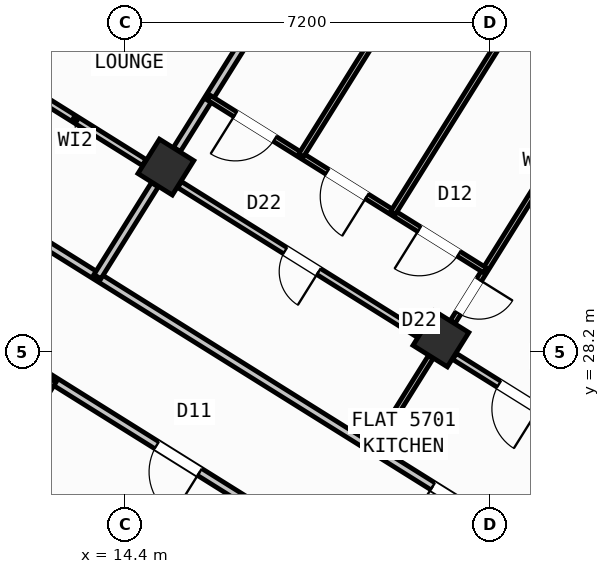
"""IFC4 building model, lengths in metres.
Left out: names, types, materials, properties, quantities, classifications, styles, units other than length and angle.
Written with IfcOpenShell. Run it as: python <this file> out.ifc"""

import sys

from ifc_helpers import new_model, si_unit, direction, frame, frame_2d, origin, origin_2d, place, context, subcontext, project, spatial, rectangle, hollow_rectangle, extrude, source, transform, mapped, element, fill, save


model = new_model("IFC4")
c1 = context("Model", 3, precision=1e-05, world=origin(), true_north=direction((0.0, 1.0)))
c2 = subcontext(c1, "Body", "Model", "MODEL_VIEW")
j1 = project(units=[si_unit("LENGTHUNIT", "METRE"), si_unit("PLANEANGLEUNIT", "RADIAN")], contexts=[c1])
p1 = place(None, origin())
s1 = spatial("IfcSite", under=j1, at=p1, CompositionType="ELEMENT")
p2 = place(p1, origin())
s2 = spatial("IfcBuilding", under=s1, at=p2, CompositionType="ELEMENT")
p3 = place(p2, frame((0.0, 0.0, 225.6)))
s3 = spatial("IfcBuildingStorey", under=s2, at=p3, CompositionType="ELEMENT", Elevation=225.6)
m1 = source(origin(), c2, "Body", "SweptSolid", [
    extrude(hollow_rectangle(XDim=0.8, YDim=0.8, WallThickness=0.032, at=origin_2d()), origin(), (0.0, 0.0, 1.0), 3.6),
])
for number, where, z_axis, x_axis in (
    (1, (20.632, 28.452, 0.0), (0.0, 0.0, 1.0), (-0.848, 0.53, 0.0)),
    (2, (15.205, 31.844, 0.0), (0.0, 0.0, 1.0), (-0.848, 0.53, 0.0)),
):
    element("IfcColumn", number, at=place(p3, frame(where, z_axis=z_axis, x_axis=x_axis)), inside=s3, PredefinedType="COLUMN", context=c2, shape_type="MappedRepresentation", body=[
        mapped(m1, transform((0.0, 0.0, 0.0), scale=1.0)),
    ])
p4 = place(p3, frame((31.76, 12.183, 0.0), z_axis=(0.0, 0.0, 1.0), x_axis=(-0.848047074256, 0.529920899612, 0.0)))
e3 = element("IfcWall", 3, at=p4, inside=s3, PredefinedType="STANDARD", context=c2, shape_type="SweptSolid", body=[
    extrude(rectangle(XDim=30.652, YDim=0.32, at=frame_2d((15.326, 0.0))), origin(), (0.0, 0.0, 1.0), 3.35),
])
p5 = place(p4, frame((15.166, 0.0, 0.0)))
e4 = element("IfcOpeningElement", 4, at=p5, cuts=e3, PredefinedType="OPENING", context=c2, shape_type="SweptSolid", body=[
    extrude(rectangle(XDim=1.2, YDim=2.15, at=frame_2d((0.6, 1.075))), frame((0.0, 0.17, 0.0), z_axis=(0.0, -1.0, 0.0), x_axis=(1.0, 0.0, 0.0)), (0.0, 0.0, 1.0), 0.34),
])
p6 = place(p4, frame((2.24, 0.0, 0.9)))
e5 = element("IfcOpeningElement", 5, at=p6, cuts=e3, PredefinedType="OPENING", context=c2, shape_type="SweptSolid", body=[
    extrude(rectangle(XDim=1.65, YDim=1.45, at=frame_2d((0.825, 0.725))), frame((0.0, 0.17, 0.0), z_axis=(0.0, -1.0, 0.0), x_axis=(1.0, 0.0, 0.0)), (0.0, 0.0, 1.0), 0.34),
])
p7 = place(p4, frame((7.469, 0.0, 0.9)))
e6 = element("IfcOpeningElement", 6, at=p7, cuts=e3, PredefinedType="OPENING", context=c2, shape_type="SweptSolid", body=[
    extrude(rectangle(XDim=1.65, YDim=1.45, at=frame_2d((0.825, 0.725))), frame((0.0, 0.17, 0.0), z_axis=(0.0, -1.0, 0.0), x_axis=(1.0, 0.0, 0.0)), (0.0, 0.0, 1.0), 0.34),
])
p8 = place(p4, frame((12.623, 0.0, 1.0)))
e7 = element("IfcOpeningElement", 7, at=p8, cuts=e3, PredefinedType="OPENING", context=c2, shape_type="SweptSolid", body=[
    extrude(rectangle(XDim=0.9, YDim=1.25, at=frame_2d((0.45, 0.625))), frame((0.0, 0.17, 0.0), z_axis=(0.0, -1.0, 0.0), x_axis=(1.0, 0.0, 0.0)), (0.0, 0.0, 1.0), 0.34),
])
p9 = place(p4, frame((19.556, 0.0, 1.0)))
e8 = element("IfcOpeningElement", 8, at=p9, cuts=e3, PredefinedType="OPENING", context=c2, shape_type="SweptSolid", body=[
    extrude(rectangle(XDim=0.9, YDim=1.25, at=frame_2d((0.45, 0.625))), frame((0.0, 0.17, 0.0), z_axis=(0.0, -1.0, 0.0), x_axis=(1.0, 0.0, 0.0)), (0.0, 0.0, 1.0), 0.34),
])
p10 = place(p4, frame((21.95, 0.0, 1.0)))
e9 = element("IfcOpeningElement", 9, at=p10, cuts=e3, PredefinedType="OPENING", context=c2, shape_type="SweptSolid", body=[
    extrude(rectangle(XDim=0.9, YDim=1.25, at=frame_2d((0.45, 0.625))), frame((0.0, 0.17, 0.0), z_axis=(0.0, -1.0, 0.0), x_axis=(1.0, 0.0, 0.0)), (0.0, 0.0, 1.0), 0.34),
])
p11 = place(p4, frame((26.983, 0.0, 0.9)))
e10 = element("IfcOpeningElement", 10, at=p11, cuts=e3, PredefinedType="OPENING", context=c2, shape_type="SweptSolid", body=[
    extrude(rectangle(XDim=1.35, YDim=1.45, at=frame_2d((0.675, 0.725))), frame((0.0, 0.17, 0.0), z_axis=(0.0, -1.0, 0.0), x_axis=(1.0, 0.0, 0.0)), (0.0, 0.0, 1.0), 0.34),
])
p12 = place(p3, frame((5.7, 28.71, 0.0), z_axis=(0.0, 0.0, 1.0), x_axis=(0.529923711467, 0.8480453172, 0.0)))
e11 = element("IfcWall", 11, at=p12, inside=s3, PredefinedType="STANDARD", context=c2, shape_type="SweptSolid", body=[
    extrude(rectangle(XDim=21.587, YDim=0.32, at=frame_2d((10.794, 0.0))), origin(), (0.0, 0.0, 1.0), 2.825),
])
p13 = place(p12, frame((1.329, 0.0, 1.0)))
e12 = element("IfcOpeningElement", 12, at=p13, cuts=e11, PredefinedType="OPENING", context=c2, shape_type="SweptSolid", body=[
    extrude(rectangle(XDim=0.9, YDim=1.25, at=frame_2d((0.45, 0.625))), frame((0.0, 0.17, 0.0), z_axis=(0.0, -1.0, 0.0), x_axis=(1.0, 0.0, 0.0)), (0.0, 0.0, 1.0), 0.34),
])
p14 = place(p12, frame((5.859, 0.0, 1.0)))
e13 = element("IfcOpeningElement", 13, at=p14, cuts=e11, PredefinedType="OPENING", context=c2, shape_type="SweptSolid", body=[
    extrude(rectangle(XDim=0.9, YDim=1.25, at=frame_2d((0.45, 0.625))), frame((0.0, 0.17, 0.0), z_axis=(0.0, -1.0, 0.0), x_axis=(1.0, 0.0, 0.0)), (0.0, 0.0, 1.0), 0.34),
])
p15 = place(p12, frame((10.369, 0.0, 0.95)))
e14 = element("IfcOpeningElement", 14, at=p15, cuts=e11, PredefinedType="OPENING", context=c2, shape_type="SweptSolid", body=[
    extrude(rectangle(XDim=1.95, YDim=1.35, at=frame_2d((0.975, 0.675))), frame((0.0, 0.17, 0.0), z_axis=(0.0, -1.0, 0.0), x_axis=(1.0, 0.0, 0.0)), (0.0, 0.0, 1.0), 0.34),
])
p16 = place(p12, frame((16.5, 0.0, 1.0)))
e15 = element("IfcOpeningElement", 15, at=p16, cuts=e11, PredefinedType="OPENING", context=c2, shape_type="SweptSolid", body=[
    extrude(rectangle(XDim=0.9, YDim=1.25, at=frame_2d((0.45, 0.625))), frame((0.0, 0.17, 0.0), z_axis=(0.0, -1.0, 0.0), x_axis=(1.0, 0.0, 0.0)), (0.0, 0.0, 1.0), 0.34),
])
p17 = place(p12, frame((18.913, 0.0, 1.0)))
e16 = element("IfcOpeningElement", 16, at=p17, cuts=e11, PredefinedType="OPENING", context=c2, shape_type="SweptSolid", body=[
    extrude(rectangle(XDim=0.9, YDim=1.25, at=frame_2d((0.45, 0.625))), frame((0.0, 0.17, 0.0), z_axis=(0.0, -1.0, 0.0), x_axis=(1.0, 0.0, 0.0)), (0.0, 0.0, 1.0), 0.34),
])
p18 = place(p3, frame((17.424, 47.083, 0.0), z_axis=(0.0, 0.0, 1.0), x_axis=(0.848049927979, -0.529916332693, 0.0)))
e17 = element("IfcWall", 17, at=p18, inside=s3, PredefinedType="STANDARD", context=c2, shape_type="SweptSolid", body=[
    extrude(rectangle(XDim=29.223, YDim=0.32, at=frame_2d((14.612, 0.0))), origin(), (0.0, 0.0, 1.0), 3.35),
])
p19 = place(p18, frame((3.709, 0.0, 0.0)))
e18 = element("IfcOpeningElement", 18, at=p19, cuts=e17, PredefinedType="OPENING", context=c2, shape_type="SweptSolid", body=[
    extrude(rectangle(XDim=1.05, YDim=2.15, at=frame_2d((0.525, 1.075))), frame((0.0, 0.17, 0.0), z_axis=(0.0, -1.0, 0.0), x_axis=(1.0, 0.0, 0.0)), (0.0, 0.0, 1.0), 0.34),
])
p20 = place(p18, frame((0.809, 0.0, 1.0)))
e19 = element("IfcOpeningElement", 19, at=p20, cuts=e17, PredefinedType="OPENING", context=c2, shape_type="SweptSolid", body=[
    extrude(rectangle(XDim=0.9, YDim=1.25, at=frame_2d((0.45, 0.625))), frame((0.0, 0.17, 0.0), z_axis=(0.0, -1.0, 0.0), x_axis=(1.0, 0.0, 0.0)), (0.0, 0.0, 1.0), 0.34),
])
p21 = place(p18, frame((13.811, 0.0, 0.9)))
e20 = element("IfcOpeningElement", 20, at=p21, cuts=e17, PredefinedType="OPENING", context=c2, shape_type="SweptSolid", body=[
    extrude(rectangle(XDim=1.35, YDim=1.45, at=frame_2d((0.675, 0.725))), frame((0.0, 0.17, 0.0), z_axis=(0.0, -1.0, 0.0), x_axis=(1.0, 0.0, 0.0)), (0.0, 0.0, 1.0), 0.34),
])
p22 = place(p18, frame((17.254, 0.0, 1.0)))
e21 = element("IfcOpeningElement", 21, at=p22, cuts=e17, PredefinedType="OPENING", context=c2, shape_type="SweptSolid", body=[
    extrude(rectangle(XDim=0.9, YDim=1.25, at=frame_2d((0.45, 0.625))), frame((0.0, 0.17, 0.0), z_axis=(0.0, -1.0, 0.0), x_axis=(1.0, 0.0, 0.0)), (0.0, 0.0, 1.0), 0.34),
])
p23 = place(p18, frame((21.364, 0.0, 1.0)))
e22 = element("IfcOpeningElement", 22, at=p23, cuts=e17, PredefinedType="OPENING", context=c2, shape_type="SweptSolid", body=[
    extrude(rectangle(XDim=0.9, YDim=1.25, at=frame_2d((0.45, 0.625))), frame((0.0, 0.17, 0.0), z_axis=(0.0, -1.0, 0.0), x_axis=(1.0, 0.0, 0.0)), (0.0, 0.0, 1.0), 0.34),
])
p24 = place(p18, frame((26.003, 0.0, 1.0)))
e23 = element("IfcOpeningElement", 23, at=p24, cuts=e17, PredefinedType="OPENING", context=c2, shape_type="SweptSolid", body=[
    extrude(rectangle(XDim=0.9, YDim=1.25, at=frame_2d((0.45, 0.625))), frame((0.0, 0.17, 0.0), z_axis=(0.0, -1.0, 0.0), x_axis=(1.0, 0.0, 0.0)), (0.0, 0.0, 1.0), 0.34),
])
p25 = place(p18, frame((11.211, 0.0, 1.0)))
e24 = element("IfcOpeningElement", 24, at=p25, cuts=e17, PredefinedType="OPENING", context=c2, shape_type="SweptSolid", body=[
    extrude(rectangle(XDim=0.65, YDim=1.15, at=frame_2d((0.325, 0.575))), frame((0.0, 0.17, 0.0), z_axis=(0.0, -1.0, 0.0), x_axis=(1.0, 0.0, 0.0)), (0.0, 0.0, 1.0), 0.34),
])
p26 = place(p18, frame((9.079, 0.0, 1.0)))
e25 = element("IfcOpeningElement", 25, at=p26, cuts=e17, PredefinedType="OPENING", context=c2, shape_type="SweptSolid", body=[
    extrude(rectangle(XDim=0.65, YDim=1.15, at=frame_2d((0.325, 0.575))), frame((0.0, 0.17, 0.0), z_axis=(0.0, -1.0, 0.0), x_axis=(1.0, 0.0, 0.0)), (0.0, 0.0, 1.0), 0.34),
])
p27 = place(p18, frame((6.951, 0.0, 1.0)))
e26 = element("IfcOpeningElement", 26, at=p27, cuts=e17, PredefinedType="OPENING", context=c2, shape_type="SweptSolid", body=[
    extrude(rectangle(XDim=0.65, YDim=1.15, at=frame_2d((0.325, 0.575))), frame((0.0, 0.17, 0.0), z_axis=(0.0, -1.0, 0.0), x_axis=(1.0, 0.0, 0.0)), (0.0, 0.0, 1.0), 0.34),
])
p28 = place(p3, frame((22.495, 24.281, 0.0), z_axis=(0.0, 0.0, 1.0), x_axis=(-0.848052408131, 0.529912363569, 0.0)))
e27 = element("IfcWall", 27, at=p28, inside=s3, PredefinedType="PARTITIONING", context=c2, shape_type="SweptSolid", body=[
    extrude(rectangle(XDim=16.73, YDim=0.16, at=frame_2d((8.365, 0.0))), origin(), (0.0, 0.0, 1.0), 3.34),
])
p29 = place(p28, frame((1.385, 0.0, 0.0)))
e28 = element("IfcOpeningElement", 28, at=p29, cuts=e27, PredefinedType="OPENING", context=c2, shape_type="SweptSolid", body=[
    extrude(rectangle(XDim=1.0, YDim=2.1, at=frame_2d((0.5, 1.05))), frame((0.0, 0.09, 0.0), z_axis=(0.0, -1.0, 0.0), x_axis=(1.0, 0.0, 0.0)), (0.0, 0.0, 1.0), 0.18),
])
p30 = place(p28, frame((14.76, 0.0, 0.0)))
e29 = element("IfcOpeningElement", 29, at=p30, cuts=e27, PredefinedType="OPENING", context=c2, shape_type="SweptSolid", body=[
    extrude(rectangle(XDim=1.0, YDim=2.1, at=frame_2d((0.5, 1.05))), frame((0.0, 0.09, 0.0), z_axis=(0.0, -1.0, 0.0), x_axis=(1.0, 0.0, 0.0)), (0.0, 0.0, 1.0), 0.18),
])
p31 = place(p3, frame((21.329, 22.416, 0.0), z_axis=(0.0, 0.0, 1.0), x_axis=(-0.848052408131, 0.529912363569, 0.0)))
e30 = element("IfcWall", 30, at=p31, inside=s3, PredefinedType="PARTITIONING", context=c2, shape_type="SweptSolid", body=[
    extrude(rectangle(XDim=16.73, YDim=0.16, at=frame_2d((8.365, 0.0))), origin(), (0.0, 0.0, 1.0), 3.34),
])
p32 = place(p31, frame((1.505, 0.0, 0.0)))
e31 = element("IfcOpeningElement", 31, at=p32, cuts=e30, PredefinedType="OPENING", context=c2, shape_type="SweptSolid", body=[
    extrude(rectangle(XDim=1.0, YDim=2.1, at=frame_2d((0.5, 1.05))), frame((0.0, 0.09, 0.0), z_axis=(0.0, -1.0, 0.0), x_axis=(1.0, 0.0, 0.0)), (0.0, 0.0, 1.0), 0.18),
])
p33 = place(p31, frame((6.435, 0.0, 0.0)))
e32 = element("IfcOpeningElement", 32, at=p33, cuts=e30, PredefinedType="OPENING", context=c2, shape_type="SweptSolid", body=[
    extrude(rectangle(XDim=1.0, YDim=2.1, at=frame_2d((0.5, 1.05))), frame((0.0, 0.09, 0.0), z_axis=(0.0, -1.0, 0.0), x_axis=(1.0, 0.0, 0.0)), (0.0, 0.0, 1.0), 0.18),
])
p34 = place(p31, frame((12.784, 0.0, 0.0)))
e33 = element("IfcOpeningElement", 33, at=p34, cuts=e30, PredefinedType="OPENING", context=c2, shape_type="SweptSolid", body=[
    extrude(rectangle(XDim=1.0, YDim=2.1, at=frame_2d((0.5, 1.05))), frame((0.0, 0.09, 0.0), z_axis=(0.0, -1.0, 0.0), x_axis=(1.0, 0.0, 0.0)), (0.0, 0.0, 1.0), 0.18),
])
p35 = place(p3, frame((12.968, 27.64, 0.0), z_axis=(0.0, 0.0, 1.0), x_axis=(-0.52989628283, -0.848062456098, 0.0)))
e34 = element("IfcWall", 34, at=p35, inside=s3, PredefinedType="PARTITIONING", context=c2, shape_type="SweptSolid", body=[
    extrude(rectangle(XDim=2.138, YDim=0.16, at=frame_2d((1.069, 0.0))), origin(), (0.0, 0.0, 1.0), 3.34),
])
p36 = place(p3, frame((18.854, 37.685, 0.0), z_axis=(0.0, 0.0, 1.0), x_axis=(-0.529907440938, -0.848055484057, 0.0)))
e35 = element("IfcWall", 35, at=p36, inside=s3, PredefinedType="PARTITIONING", context=c2, shape_type="SweptSolid", body=[
    extrude(rectangle(XDim=6.476, YDim=0.16, at=frame_2d((3.238, 0.0))), origin(), (0.0, 0.0, 1.0), 2.825),
])
p37 = place(p3, frame((14.986, 31.494, 0.0), z_axis=(0.0, 0.0, 1.0), x_axis=(-0.52989628283, -0.848062456098, 0.0)))
e36 = element("IfcWall", 36, at=p37, inside=s3, PredefinedType="PARTITIONING", context=c2, shape_type="SweptSolid", body=[
    extrude(rectangle(XDim=2.138, YDim=0.16, at=frame_2d((1.069, 0.0))), origin(), (0.0, 0.0, 1.0), 2.825),
])
p38 = place(p3, frame((24.299, 34.283, 0.0), z_axis=(0.0, 0.0, 1.0), x_axis=(-0.529890499457, -0.848066069705, 0.0)))
e37 = element("IfcWall", 37, at=p38, inside=s3, PredefinedType="PARTITIONING", context=c2, shape_type="SweptSolid", body=[
    extrude(rectangle(XDim=6.476, YDim=0.11, at=frame_2d((3.238, 0.0))), origin(), (0.0, 0.0, 1.0), 2.825),
])
p39 = place(p38, frame((5.496, 0.0, 0.0)))
e38 = element("IfcOpeningElement", 38, at=p39, cuts=e37, PredefinedType="OPENING", context=c2, shape_type="SweptSolid", body=[
    extrude(rectangle(XDim=0.78, YDim=2.05, at=frame_2d((0.39, 1.025))), frame((0.0, 0.065, 0.0), z_axis=(0.0, -1.0, 0.0), x_axis=(1.0, 0.0, 0.0)), (0.0, 0.0, 1.0), 0.13),
])
p40 = place(p3, frame((20.431, 28.092, 0.0), z_axis=(0.0, 0.0, 1.0), x_axis=(-0.529978410432, -0.848011134641, 0.0)))
e39 = element("IfcWall", 39, at=p40, inside=s3, PredefinedType="PARTITIONING", context=c2, shape_type="SweptSolid", body=[
    extrude(rectangle(XDim=2.138, YDim=0.11, at=frame_2d((1.069, 0.0))), origin(), (0.0, 0.0, 1.0), 2.825),
])
p41 = place(p3, frame((23.767, 26.316, 0.0), z_axis=(0.0, 0.0, 1.0), x_axis=(-0.848055143312, 0.529907986259, 0.0)))
e40 = element("IfcWall", 40, at=p41, inside=s3, PredefinedType="PLUMBINGWALL", context=c2, shape_type="SweptSolid", body=[
    extrude(rectangle(XDim=3.378, YDim=0.14, at=frame_2d((1.689, 0.0))), origin(), (0.0, 0.0, 1.0), 2.825),
])
p42 = place(p41, frame((1.425, 0.0, 0.0)))
e41 = element("IfcOpeningElement", 41, at=p42, cuts=e40, PredefinedType="OPENING", context=c2, shape_type="SweptSolid", body=[
    extrude(rectangle(XDim=0.92, YDim=2.08, at=frame_2d((0.46, 1.04))), frame((0.0, 0.08, 0.0), z_axis=(0.0, -1.0, 0.0), x_axis=(1.0, 0.0, 0.0)), (0.0, 0.0, 1.0), 0.16),
])
p43 = place(p3, frame((20.203, 28.543, 0.0), z_axis=(0.0, 0.0, 1.0), x_axis=(-0.848049955116, 0.529916289265, 0.0)))
e42 = element("IfcWall", 42, at=p43, inside=s3, PredefinedType="PLUMBINGWALL", context=c2, shape_type="SweptSolid", body=[
    extrude(rectangle(XDim=5.576, YDim=0.14, at=frame_2d((2.788, 0.0))), origin(), (0.0, 0.0, 1.0), 2.825),
])
p44 = place(p43, frame((2.338, 0.0, 0.0)))
e43 = element("IfcOpeningElement", 43, at=p44, cuts=e42, PredefinedType="OPENING", context=c2, shape_type="SweptSolid", body=[
    extrude(rectangle(XDim=0.78, YDim=2.05, at=frame_2d((0.39, 1.025))), frame((0.0, 0.08, 0.0), z_axis=(0.0, -1.0, 0.0), x_axis=(1.0, 0.0, 0.0)), (0.0, 0.0, 1.0), 0.16),
])
p45 = place(p3, frame((21.502, 29.807, 0.0), z_axis=(0.0, 0.0, 1.0), x_axis=(-0.848051709137, 0.529913482212, 0.0)))
e44 = element("IfcWall", 44, at=p45, inside=s3, PredefinedType="PARTITIONING", context=c2, shape_type="SweptSolid", body=[
    extrude(rectangle(XDim=6.42, YDim=0.11, at=frame_2d((3.21, 0.0))), origin(), (0.0, 0.0, 1.0), 3.34),
])
p46 = place(p45, frame((0.61, 0.0, 0.0)))
e45 = element("IfcOpeningElement", 45, at=p46, cuts=e44, PredefinedType="OPENING", context=c2, shape_type="SweptSolid", body=[
    extrude(rectangle(XDim=0.92, YDim=2.08, at=frame_2d((0.46, 1.04))), frame((0.0, 0.065, 0.0), z_axis=(0.0, -1.0, 0.0), x_axis=(1.0, 0.0, 0.0)), (0.0, 0.0, 1.0), 0.13),
])
p47 = place(p45, frame((2.75, 0.0, 0.0)))
e46 = element("IfcOpeningElement", 46, at=p47, cuts=e44, PredefinedType="OPENING", context=c2, shape_type="SweptSolid", body=[
    extrude(rectangle(XDim=0.92, YDim=2.08, at=frame_2d((0.46, 1.04))), frame((0.0, 0.065, 0.0), z_axis=(0.0, -1.0, 0.0), x_axis=(1.0, 0.0, 0.0)), (0.0, 0.0, 1.0), 0.13),
])
p48 = place(p45, frame((4.89, 0.0, 0.0)))
e47 = element("IfcOpeningElement", 47, at=p48, cuts=e44, PredefinedType="OPENING", context=c2, shape_type="SweptSolid", body=[
    extrude(rectangle(XDim=0.92, YDim=2.08, at=frame_2d((0.46, 1.04))), frame((0.0, 0.065, 0.0), z_axis=(0.0, -1.0, 0.0), x_axis=(1.0, 0.0, 0.0)), (0.0, 0.0, 1.0), 0.13),
])
p49 = place(p3, frame((26.37, 41.635, 0.0), z_axis=(0.0, 0.0, 1.0), x_axis=(-0.529925845384, -0.848043983761, 0.0)))
e48 = element("IfcWall", 48, at=p49, inside=s3, PredefinedType="PARTITIONING", context=c2, shape_type="SweptSolid", body=[
    extrude(rectangle(XDim=12.61, YDim=0.11, at=frame_2d((6.305, 0.0))), origin(), (0.0, 0.0, 1.0), 2.995),
])
p50 = place(p3, frame((24.555, 42.769, 0.0), z_axis=(0.0, 0.0, 1.0), x_axis=(-0.529911921261, -0.848052684511, 0.0)))
e49 = element("IfcWall", 49, at=p50, inside=s3, PredefinedType="PARTITIONING", context=c2, shape_type="SweptSolid", body=[
    extrude(rectangle(XDim=12.61, YDim=0.11, at=frame_2d((6.305, 0.0))), origin(), (0.0, 0.0, 1.0), 2.995),
])
p51 = place(p3, frame((19.67, 45.821, 0.0), z_axis=(0.0, 0.0, 1.0), x_axis=(-0.529920421309, -0.848047373134, 0.0)))
e50 = element("IfcWall", 50, at=p51, inside=s3, PredefinedType="PARTITIONING", context=c2, shape_type="SweptSolid", body=[
    extrude(rectangle(XDim=16.77, YDim=0.11, at=frame_2d((8.385, 0.0))), origin(), (0.0, 0.0, 1.0), 3.34),
])
p52 = place(p51, frame((15.13, 0.0, 0.0)))
e51 = element("IfcOpeningElement", 51, at=p52, cuts=e50, PredefinedType="OPENING", context=c2, shape_type="SweptSolid", body=[
    extrude(rectangle(XDim=0.78, YDim=2.05, at=frame_2d((0.39, 1.025))), frame((0.0, 0.065, 0.0), z_axis=(0.0, -1.0, 0.0), x_axis=(1.0, 0.0, 0.0)), (0.0, 0.0, 1.0), 0.13),
])
p53 = place(p51, frame((9.884, 0.0, 0.0)))
e52 = element("IfcOpeningElement", 52, at=p53, cuts=e50, PredefinedType="OPENING", context=c2, shape_type="SweptSolid", body=[
    extrude(rectangle(XDim=0.92, YDim=2.08, at=frame_2d((0.46, 1.04))), frame((0.0, 0.065, 0.0), z_axis=(0.0, -1.0, 0.0), x_axis=(1.0, 0.0, 0.0)), (0.0, 0.0, 1.0), 0.13),
])
p54 = place(p3, frame((14.776, 31.935, 0.0), z_axis=(0.0, 0.0, 1.0), x_axis=(-0.848011130036, 0.529978417802, 0.0)))
e53 = element("IfcWall", 53, at=p54, inside=s3, PredefinedType="PLUMBINGWALL", context=c2, shape_type="SweptSolid", body=[
    extrude(rectangle(XDim=3.208, YDim=0.14, at=frame_2d((1.604, 0.0))), origin(), (0.0, 0.0, 1.0), 2.825),
])
m2 = source(origin(), c2, "Body", "SweptSolid", [
    extrude(rectangle(XDim=1.0, YDim=2.1, at=frame_2d((0.5, 1.05))), frame((0.0, 0.025, 0.0), z_axis=(0.0, -1.0, 0.0), x_axis=(1.0, 0.0, 0.0)), (0.0, 0.0, 1.0), 0.05),
])
p55 = place(p33, origin())
e54 = element("IfcDoor", 54, at=p55, inside=s3, OperationType="SINGLE_SWING_LEFT", PredefinedType="DOOR", context=c2, shape_type="MappedRepresentation", body=[
    mapped(m2, transform((0.0, 0.0, 0.0), scale=1.0)),
])
fill(e32, e54)
p56 = place(p29, origin())
e55 = element("IfcDoor", 55, at=p56, inside=s3, OperationType="SINGLE_SWING_RIGHT", PredefinedType="DOOR", context=c2, shape_type="MappedRepresentation", body=[
    mapped(m2, transform((0.0, 0.0, 0.0), scale=1.0)),
])
fill(e28, e55)
m3 = source(origin(), c2, "Body", "SweptSolid", [
    extrude(rectangle(XDim=0.92, YDim=2.08, at=frame_2d((0.46, 1.04))), frame((0.0, 0.025, 0.0), z_axis=(0.0, -1.0, 0.0), x_axis=(1.0, 0.0, 0.0)), (0.0, 0.0, 1.0), 0.05),
])
p57 = place(p42, origin())
e56 = element("IfcDoor", 56, at=p57, inside=s3, OperationType="SINGLE_SWING_LEFT", PredefinedType="DOOR", context=c2, shape_type="MappedRepresentation", body=[
    mapped(m3, transform((0.0, 0.0, 0.0), scale=1.0)),
])
fill(e41, e56)
m4 = source(origin(), c2, "Body", "SweptSolid", [
    extrude(rectangle(XDim=0.78, YDim=2.05, at=frame_2d((0.39, 1.025))), frame((0.0, 0.025, 0.0), z_axis=(0.0, -1.0, 0.0), x_axis=(1.0, 0.0, 0.0)), (0.0, 0.0, 1.0), 0.05),
])
p58 = place(p39, origin())
e57 = element("IfcDoor", 57, at=p58, inside=s3, OperationType="SINGLE_SWING_LEFT", PredefinedType="DOOR", context=c2, shape_type="MappedRepresentation", body=[
    mapped(m4, transform((0.0, 0.0, 0.0), scale=1.0)),
])
fill(e38, e57)
p59 = place(p44, origin())
e58 = element("IfcDoor", 58, at=p59, inside=s3, OperationType="SINGLE_SWING_LEFT", PredefinedType="DOOR", context=c2, shape_type="MappedRepresentation", body=[
    mapped(m4, transform((0.0, 0.0, 0.0), scale=1.0)),
])
fill(e43, e58)
p60 = place(p46, origin())
e59 = element("IfcDoor", 59, at=p60, inside=s3, OperationType="SINGLE_SWING_RIGHT", PredefinedType="DOOR", context=c2, shape_type="MappedRepresentation", body=[
    mapped(m3, transform((0.0, 0.0, 0.0), scale=1.0)),
])
fill(e45, e59)
p61 = place(p47, origin())
e60 = element("IfcDoor", 60, at=p61, inside=s3, OperationType="SINGLE_SWING_LEFT", PredefinedType="DOOR", context=c2, shape_type="MappedRepresentation", body=[
    mapped(m3, transform((0.0, 0.0, 0.0), scale=1.0)),
])
fill(e46, e60)
p62 = place(p48, origin())
e61 = element("IfcDoor", 61, at=p62, inside=s3, OperationType="SINGLE_SWING_RIGHT", PredefinedType="DOOR", context=c2, shape_type="MappedRepresentation", body=[
    mapped(m3, transform((0.0, 0.0, 0.0), scale=1.0)),
])
fill(e47, e61)
save(model, sys.argv[1])
